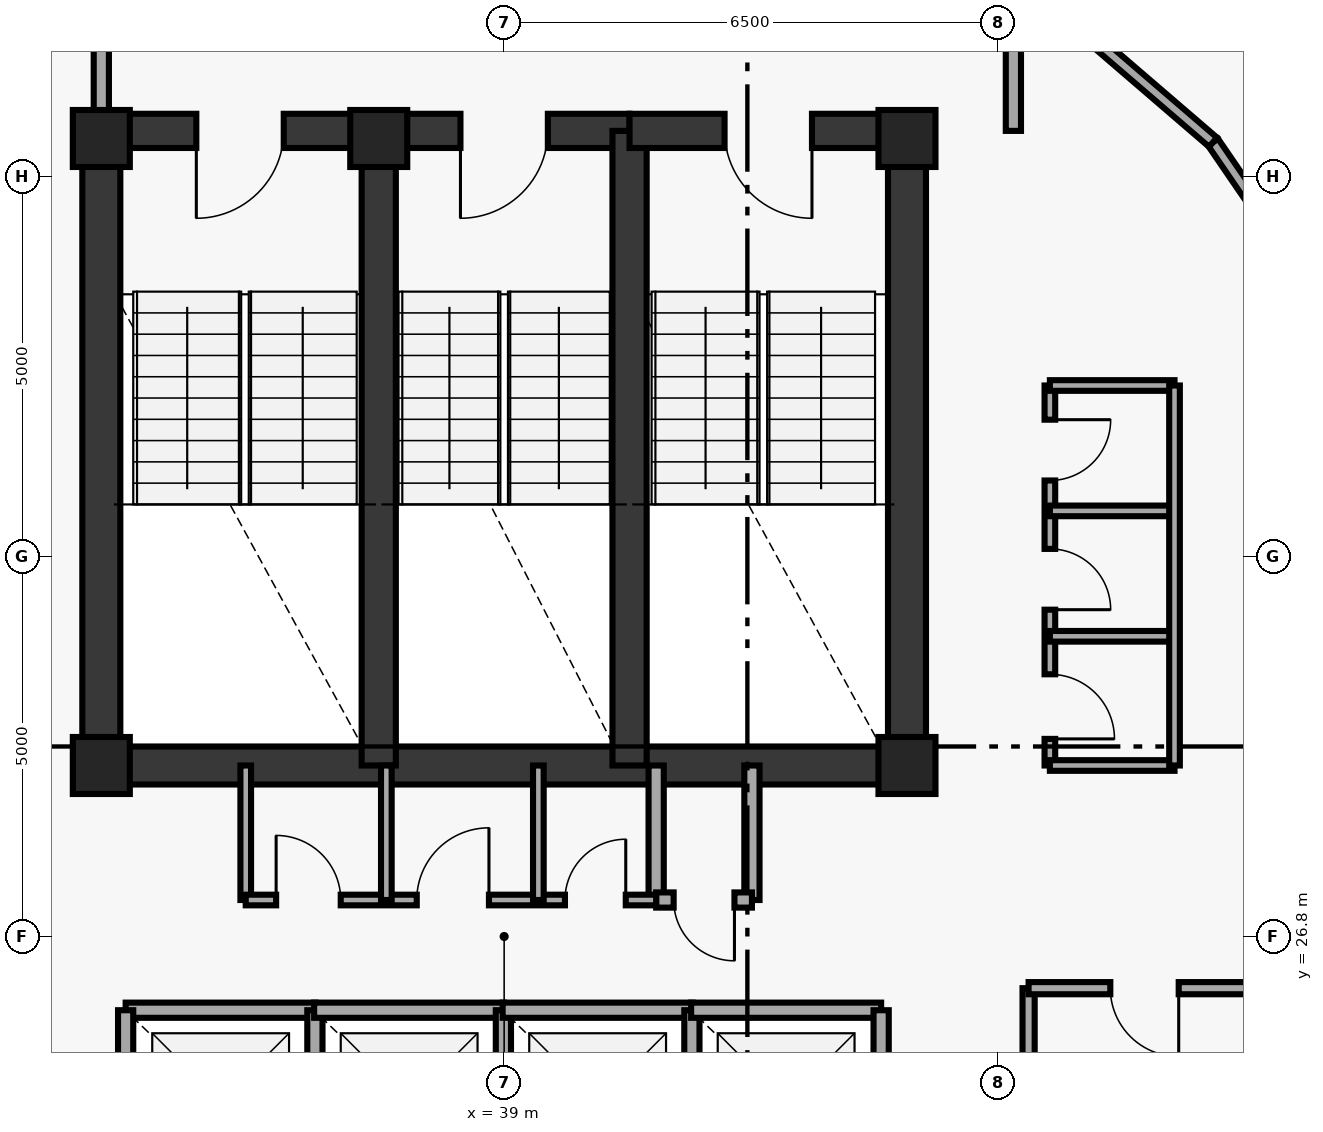
"""IFC4 building model, lengths in metres.
Left out: names, types, materials, properties, quantities, classifications, styles, units other than length and angle.
Written with IfcOpenShell. Run it as: python <this file> out.ifc"""

import sys

from ifc_helpers import new_model, si_unit, direction, frame, frame_2d, origin, origin_2d, place, context, subcontext, project, spatial, rectangle, extrude, element, fill, save


model = new_model("IFC4")
c1 = context("Model", 3, precision=1e-05, world=origin(), true_north=direction((0.0, 1.0)))
c2 = subcontext(c1, "Body", "Model", "MODEL_VIEW")
j1 = project(units=[si_unit("LENGTHUNIT", "METRE"), si_unit("PLANEANGLEUNIT", "RADIAN")], contexts=[c1])
p1 = place(None, origin())
s1 = spatial("IfcSite", under=j1, at=p1, CompositionType="ELEMENT")
p2 = place(p1, origin())
s2 = spatial("IfcBuilding", under=s1, at=p2, CompositionType="ELEMENT")
p3 = place(p2, frame((0.0, 0.0, 297.4)))
s3 = spatial("IfcBuildingStorey", under=s2, at=p3, CompositionType="ELEMENT", Elevation=297.4)
for number, where, z_axis, x_axis in (
    (1, (44.3, 29.05, 0.0), (0.0, 0.0, 1.0), (1.0, 0.0, 0.0)),
    (2, (44.3, 37.3, 0.0), (0.0, 0.0, 1.0), (1.0, 0.0, 0.0)),
    (3, (37.35, 37.3, 0.0), (0.0, 0.0, 1.0), (1.0, 0.0, 0.0)),
    (4, (33.7, 37.3, 0.0), (0.0, 0.0, 1.0), (1.0, 0.0, 0.0)),
    (5, (33.7, 29.05, 0.0), (0.0, 0.0, 1.0), (1.0, 0.0, 0.0)),
):
    element("IfcColumn", number, at=place(p3, frame(where, z_axis=z_axis, x_axis=x_axis)), inside=s3, PredefinedType="PILASTER", context=c2, shape_type="SweptSolid", body=[
        extrude(rectangle(XDim=0.75, YDim=0.75, at=origin_2d()), origin(), (0.0, 0.0, 1.0), 3.45),
    ])
for number, where, z_axis, x_axis in (
    (6, (33.7, 29.05, 0.0), (0.0, 0.0, 1.0), (0.0, 1.0, 0.0)),
    (7, (44.3, 29.05, 0.0), (0.0, 0.0, 1.0), (0.0, 1.0, 0.0)),
):
    element("IfcWall", number, at=place(p3, frame(where, z_axis=z_axis, x_axis=x_axis)), inside=s3, PredefinedType="SHEAR", context=c2, shape_type="SweptSolid", body=[
        extrude(rectangle(XDim=8.35, YDim=0.5, at=frame_2d((4.175, 0.0))), origin(), (0.0, 0.0, 1.0), 3.45),
    ])
p4 = place(p3, frame((33.7, 29.05, 0.0), z_axis=(0.0, 0.0, 1.0), x_axis=(1.0, 0.0, 0.0)))
e8 = element("IfcWall", 8, at=p4, inside=s3, PredefinedType="SHEAR", context=c2, shape_type="SweptSolid", body=[
    extrude(rectangle(XDim=10.6, YDim=0.5, at=frame_2d((5.3, 0.0))), origin(), (0.0, 0.0, 1.0), 3.45),
])
p5 = place(p3, frame((37.35, 37.4, 0.0), z_axis=(0.0, 0.0, 1.0), x_axis=(-1.0, 0.0, 0.0)))
e9 = element("IfcWall", 9, at=p5, inside=s3, PredefinedType="SHEAR", context=c2, shape_type="SweptSolid", body=[
    extrude(rectangle(XDim=3.65, YDim=0.45, at=frame_2d((1.825, 0.0))), origin(), (0.0, 0.0, 1.0), 3.45),
])
p6 = place(p5, frame((1.25, 0.0, 0.0)))
e10 = element("IfcOpeningElement", 10, at=p6, cuts=e9, PredefinedType="OPENING", context=c2, shape_type="SweptSolid", body=[
    extrude(rectangle(XDim=1.15, YDim=2.15, at=frame_2d((0.575, 1.075))), frame((0.0, 0.235, 0.0), z_axis=(0.0, -1.0, 0.0), x_axis=(1.0, 0.0, 0.0)), (0.0, 0.0, 1.0), 0.47),
])
p7 = place(p3, frame((37.35, 29.05, 0.0), z_axis=(0.0, 0.0, 1.0), x_axis=(0.0, 1.0, 0.0)))
e11 = element("IfcWall", 11, at=p7, inside=s3, PredefinedType="SHEAR", context=c2, shape_type="SweptSolid", body=[
    extrude(rectangle(XDim=8.35, YDim=0.45, at=frame_2d((4.175, 0.0))), origin(), (0.0, 0.0, 1.0), 3.45),
])
p8 = place(p3, frame((40.65, 37.4, 0.0), z_axis=(0.0, 0.0, 1.0), x_axis=(-1.0, 0.0, 0.0)))
e12 = element("IfcWall", 12, at=p8, inside=s3, PredefinedType="SHEAR", context=c2, shape_type="SweptSolid", body=[
    extrude(rectangle(XDim=3.3, YDim=0.45, at=frame_2d((1.65, 0.0))), origin(), (0.0, 0.0, 1.0), 3.45),
])
p9 = place(p8, frame((1.075, 0.0, 0.0)))
e13 = element("IfcOpeningElement", 13, at=p9, cuts=e12, PredefinedType="OPENING", context=c2, shape_type="SweptSolid", body=[
    extrude(rectangle(XDim=1.15, YDim=2.15, at=frame_2d((0.575, 1.075))), frame((0.0, 0.235, 0.0), z_axis=(0.0, -1.0, 0.0), x_axis=(1.0, 0.0, 0.0)), (0.0, 0.0, 1.0), 0.47),
])
p10 = place(p3, frame((40.65, 29.05, 0.0), z_axis=(0.0, 0.0, 1.0), x_axis=(0.0, 1.0, 0.0)))
e14 = element("IfcWall", 14, at=p10, inside=s3, PredefinedType="SHEAR", context=c2, shape_type="SweptSolid", body=[
    extrude(rectangle(XDim=8.35, YDim=0.45, at=frame_2d((4.175, 0.0))), origin(), (0.0, 0.0, 1.0), 3.45),
])
p11 = place(p3, frame((44.3, 37.4, 0.0), z_axis=(0.0, 0.0, 1.0), x_axis=(-1.0, 0.0, 0.0)))
e15 = element("IfcWall", 15, at=p11, inside=s3, PredefinedType="SHEAR", context=c2, shape_type="SweptSolid", body=[
    extrude(rectangle(XDim=3.65, YDim=0.45, at=frame_2d((1.825, 0.0))), origin(), (0.0, 0.0, 1.0), 3.45),
])
p12 = place(p11, frame((1.25, 0.0, 0.0)))
e16 = element("IfcOpeningElement", 16, at=p12, cuts=e15, PredefinedType="OPENING", context=c2, shape_type="SweptSolid", body=[
    extrude(rectangle(XDim=1.15, YDim=2.15, at=frame_2d((0.575, 1.075))), frame((0.0, 0.235, 0.0), z_axis=(0.0, -1.0, 0.0), x_axis=(1.0, 0.0, 0.0)), (0.0, 0.0, 1.0), 0.47),
])
for number, where, z_axis, x_axis in (
    (17, (33.7, 37.4, 0.0), (0.0, 0.0, 1.0), (0.0, 1.0, 0.0)),
    (18, (45.7, 37.4, 0.0), (0.0, 0.0, 1.0), (0.0, 1.0, 0.0)),
):
    element("IfcWall", number, at=place(p3, frame(where, z_axis=z_axis, x_axis=x_axis)), inside=s3, PredefinedType="SOLIDWALL", context=c2, shape_type="SweptSolid", body=[
        extrude(rectangle(XDim=1.88, YDim=0.2, at=frame_2d((0.94, 0.0))), origin(), (0.0, 0.0, 1.0), 3.45),
    ])
p13 = place(p3, frame((35.6, 27.28, 0.0), z_axis=(0.0, 0.0, 1.0), x_axis=(0.0, 1.0, 0.0)))
e19 = element("IfcWall", 19, at=p13, inside=s3, PredefinedType="PARTITIONING", context=c2, shape_type="SweptSolid", body=[
    extrude(rectangle(XDim=1.77, YDim=0.14, at=frame_2d((0.885, 0.0))), origin(), (0.0, 0.0, 1.0), 3.45),
])
for number, where, z_axis, x_axis in (
    (20, (41.0, 27.28, 0.0), (0.0, 0.0, 1.0), (0.0, 1.0, 0.0)),
    (21, (42.26, 27.28, 0.0), (0.0, 0.0, 1.0), (0.0, 1.0, 0.0)),
):
    element("IfcWall", number, at=place(p3, frame(where, z_axis=z_axis, x_axis=x_axis)), inside=s3, PredefinedType="SOLIDWALL", context=c2, shape_type="SweptSolid", body=[
        extrude(rectangle(XDim=1.77, YDim=0.2, at=frame_2d((0.885, 0.0))), origin(), (0.0, 0.0, 1.0), 3.45),
    ])
p14 = place(p3, frame((41.0, 27.28, 0.0), z_axis=(0.0, 0.0, 1.0), x_axis=(1.0, 0.0, 0.0)))
e22 = element("IfcWall", 22, at=p14, inside=s3, PredefinedType="SOLIDWALL", context=c2, shape_type="SweptSolid", body=[
    extrude(rectangle(XDim=1.26, YDim=0.2, at=frame_2d((0.63, 0.0))), origin(), (0.0, 0.0, 1.0), 3.45),
])
p15 = place(p14, frame((0.23, 0.0, 0.0)))
e23 = element("IfcOpeningElement", 23, at=p15, cuts=e22, PredefinedType="OPENING", context=c2, shape_type="SweptSolid", body=[
    extrude(rectangle(XDim=0.8, YDim=2.05, at=frame_2d((0.4, 1.025))), frame((0.0, 0.11, 0.0), z_axis=(0.0, -1.0, 0.0), x_axis=(1.0, 0.0, 0.0)), (0.0, 0.0, 1.0), 0.22),
])
p16 = place(p3, frame((34.02, 25.83, 0.0), z_axis=(0.0, 0.0, 1.0), x_axis=(1.0, 0.0, 0.0)))
e24 = element("IfcWall", 24, at=p16, inside=s3, PredefinedType="SOLIDWALL", context=c2, shape_type="SweptSolid", body=[
    extrude(rectangle(XDim=2.5, YDim=0.2, at=frame_2d((1.25, 0.0))), origin(), (0.0, 0.0, 1.0), 3.45),
])
for number, where, z_axis, x_axis in (
    (25, (34.02, 23.42, 0.0), (0.0, 0.0, 1.0), (0.0, 1.0, 0.0)),
    (26, (36.51, 23.42, 0.0), (0.0, 0.0, 1.0), (0.0, 1.0, 0.0)),
):
    element("IfcWall", number, at=place(p3, frame(where, z_axis=z_axis, x_axis=x_axis)), inside=s3, PredefinedType="SOLIDWALL", context=c2, shape_type="SweptSolid", body=[
        extrude(rectangle(XDim=2.41, YDim=0.2, at=frame_2d((1.205, 0.0))), origin(), (0.0, 0.0, 1.0), 3.45),
    ])
p17 = place(p3, frame((36.5, 25.83, 0.0), z_axis=(0.0, 0.0, 1.0), x_axis=(1.0, 0.0, 0.0)))
e27 = element("IfcWall", 27, at=p17, inside=s3, PredefinedType="SOLIDWALL", context=c2, shape_type="SweptSolid", body=[
    extrude(rectangle(XDim=2.5, YDim=0.2, at=frame_2d((1.25, 0.0))), origin(), (0.0, 0.0, 1.0), 3.45),
])
p18 = place(p3, frame((38.99, 23.42, 0.0), z_axis=(0.0, 0.0, 1.0), x_axis=(0.0, 1.0, 0.0)))
e28 = element("IfcWall", 28, at=p18, inside=s3, PredefinedType="SOLIDWALL", context=c2, shape_type="SweptSolid", body=[
    extrude(rectangle(XDim=2.41, YDim=0.2, at=frame_2d((1.205, 0.0))), origin(), (0.0, 0.0, 1.0), 3.45),
])
p19 = place(p3, frame((38.98, 25.83, 0.0), z_axis=(0.0, 0.0, 1.0), x_axis=(1.0, 0.0, 0.0)))
e29 = element("IfcWall", 29, at=p19, inside=s3, PredefinedType="SOLIDWALL", context=c2, shape_type="SweptSolid", body=[
    extrude(rectangle(XDim=2.5, YDim=0.2, at=frame_2d((1.25, 0.0))), origin(), (0.0, 0.0, 1.0), 3.45),
])
p20 = place(p3, frame((41.47, 23.42, 0.0), z_axis=(0.0, 0.0, 1.0), x_axis=(0.0, 1.0, 0.0)))
e30 = element("IfcWall", 30, at=p20, inside=s3, PredefinedType="SOLIDWALL", context=c2, shape_type="SweptSolid", body=[
    extrude(rectangle(XDim=2.41, YDim=0.2, at=frame_2d((1.205, 0.0))), origin(), (0.0, 0.0, 1.0), 3.45),
])
p21 = place(p3, frame((41.46, 25.83, 0.0), z_axis=(0.0, 0.0, 1.0), x_axis=(1.0, 0.0, 0.0)))
e31 = element("IfcWall", 31, at=p21, inside=s3, PredefinedType="SOLIDWALL", context=c2, shape_type="SweptSolid", body=[
    extrude(rectangle(XDim=2.5, YDim=0.2, at=frame_2d((1.25, 0.0))), origin(), (0.0, 0.0, 1.0), 3.45),
])
p22 = place(p3, frame((43.96, 23.42, 0.0), z_axis=(0.0, 0.0, 1.0), x_axis=(0.0, 1.0, 0.0)))
e32 = element("IfcWall", 32, at=p22, inside=s3, PredefinedType="SOLIDWALL", context=c2, shape_type="SweptSolid", body=[
    extrude(rectangle(XDim=2.41, YDim=0.2, at=frame_2d((1.205, 0.0))), origin(), (0.0, 0.0, 1.0), 3.45),
])
p23 = place(p3, frame((45.9, 19.05, 0.0), z_axis=(0.0, 0.0, 1.0), x_axis=(0.0, 1.0, 0.0)))
e33 = element("IfcWall", 33, at=p23, inside=s3, PredefinedType="PARTITIONING", context=c2, shape_type="SweptSolid", body=[
    extrude(rectangle(XDim=7.07, YDim=0.16, at=frame_2d((3.535, 0.0))), origin(), (0.0, 0.0, 1.0), 3.45),
])
p24 = place(p3, frame((48.95, 26.12, 0.0), z_axis=(0.0, 0.0, 1.0), x_axis=(-1.0, 0.0, 0.0)))
e34 = element("IfcWall", 34, at=p24, inside=s3, PredefinedType="PARTITIONING", context=c2, shape_type="SweptSolid", body=[
    extrude(rectangle(XDim=3.05, YDim=0.16, at=frame_2d((1.525, 0.0))), origin(), (0.0, 0.0, 1.0), 3.45),
])
p25 = place(p24, frame((1.075, 0.0, 0.0)))
e35 = element("IfcOpeningElement", 35, at=p25, cuts=e34, PredefinedType="OPENING", context=c2, shape_type="SweptSolid", body=[
    extrude(rectangle(XDim=0.9, YDim=2.1, at=frame_2d((0.45, 1.05))), frame((0.0, 0.09, 0.0), z_axis=(0.0, -1.0, 0.0), x_axis=(1.0, 0.0, 0.0)), (0.0, 0.0, 1.0), 0.18),
])
p26 = place(p3, frame((35.6, 27.28, 0.0), z_axis=(0.0, 0.0, 1.0), x_axis=(1.0, 0.0, 0.0)))
e36 = element("IfcWall", 36, at=p26, inside=s3, PredefinedType="PARTITIONING", context=c2, shape_type="SweptSolid", body=[
    extrude(rectangle(XDim=5.4, YDim=0.14, at=frame_2d((2.7, 0.0))), origin(), (0.0, 0.0, 1.0), 3.45),
])
p27 = place(p26, frame((0.4, 0.0, 0.0)))
e37 = element("IfcOpeningElement", 37, at=p27, cuts=e36, PredefinedType="OPENING", context=c2, shape_type="SweptSolid", body=[
    extrude(rectangle(XDim=0.85, YDim=2.1, at=frame_2d((0.425, 1.05))), frame((0.0, 0.08, 0.0), z_axis=(0.0, -1.0, 0.0), x_axis=(1.0, 0.0, 0.0)), (0.0, 0.0, 1.0), 0.16),
])
p28 = place(p26, frame((2.25, 0.0, 0.0)))
e38 = element("IfcOpeningElement", 38, at=p28, cuts=e36, PredefinedType="OPENING", context=c2, shape_type="SweptSolid", body=[
    extrude(rectangle(XDim=0.95, YDim=2.1, at=frame_2d((0.475, 1.05))), frame((0.0, 0.08, 0.0), z_axis=(0.0, -1.0, 0.0), x_axis=(1.0, 0.0, 0.0)), (0.0, 0.0, 1.0), 0.16),
])
p29 = place(p26, frame((4.2, 0.0, 0.0)))
e39 = element("IfcOpeningElement", 39, at=p29, cuts=e36, PredefinedType="OPENING", context=c2, shape_type="SweptSolid", body=[
    extrude(rectangle(XDim=0.8, YDim=2.05, at=frame_2d((0.4, 1.025))), frame((0.0, 0.08, 0.0), z_axis=(0.0, -1.0, 0.0), x_axis=(1.0, 0.0, 0.0)), (0.0, 0.0, 1.0), 0.16),
])
for number, where, z_axis, x_axis in (
    (40, (37.45, 27.28, 0.0), (0.0, 0.0, 1.0), (0.0, 1.0, 0.0)),
    (41, (39.45, 27.28, 0.0), (0.0, 0.0, 1.0), (0.0, 1.0, 0.0)),
):
    element("IfcWall", number, at=place(p3, frame(where, z_axis=z_axis, x_axis=x_axis)), inside=s3, PredefinedType="PARTITIONING", context=c2, shape_type="SweptSolid", body=[
        extrude(rectangle(XDim=1.77, YDim=0.14, at=frame_2d((0.885, 0.0))), origin(), (0.0, 0.0, 1.0), 3.45),
    ])
p30 = place(p3, frame((46.18, 34.05, 0.0), z_axis=(0.0, 0.0, 1.0), x_axis=(0.0, -1.0, 0.0)))
e42 = element("IfcWall", 42, at=p30, inside=s3, PredefinedType="PARTITIONING", context=c2, shape_type="SweptSolid", body=[
    extrude(rectangle(XDim=5.0, YDim=0.14, at=frame_2d((2.5, 0.0))), origin(), (0.0, 0.0, 1.0), 3.45),
])
p31 = place(p30, frame((3.8, 0.0, 0.0)))
e43 = element("IfcOpeningElement", 43, at=p31, cuts=e42, PredefinedType="OPENING", context=c2, shape_type="SweptSolid", body=[
    extrude(rectangle(XDim=0.85, YDim=2.1, at=frame_2d((0.425, 1.05))), frame((0.0, 0.08, 0.0), z_axis=(0.0, -1.0, 0.0), x_axis=(1.0, 0.0, 0.0)), (0.0, 0.0, 1.0), 0.16),
])
p32 = place(p30, frame((2.15, 0.0, 0.0)))
e44 = element("IfcOpeningElement", 44, at=p32, cuts=e42, PredefinedType="OPENING", context=c2, shape_type="SweptSolid", body=[
    extrude(rectangle(XDim=0.8, YDim=2.05, at=frame_2d((0.4, 1.025))), frame((0.0, 0.08, 0.0), z_axis=(0.0, -1.0, 0.0), x_axis=(1.0, 0.0, 0.0)), (0.0, 0.0, 1.0), 0.16),
])
p33 = place(p30, frame((0.45, 0.0, 0.0)))
e45 = element("IfcOpeningElement", 45, at=p33, cuts=e42, PredefinedType="OPENING", context=c2, shape_type="SweptSolid", body=[
    extrude(rectangle(XDim=0.8, YDim=2.05, at=frame_2d((0.4, 1.025))), frame((0.0, 0.08, 0.0), z_axis=(0.0, -1.0, 0.0), x_axis=(1.0, 0.0, 0.0)), (0.0, 0.0, 1.0), 0.16),
])
for number, where, z_axis, x_axis in (
    (46, (46.18, 29.05, 0.0), (0.0, 0.0, 1.0), (1.0, 0.0, 0.0)),
    (47, (46.18, 30.75, 0.0), (0.0, 0.0, 1.0), (1.0, 0.0, 0.0)),
    (48, (46.18, 32.4, 0.0), (0.0, 0.0, 1.0), (1.0, 0.0, 0.0)),
    (49, (46.18, 34.05, 0.0), (0.0, 0.0, 1.0), (1.0, 0.0, 0.0)),
):
    element("IfcWall", number, at=place(p3, frame(where, z_axis=z_axis, x_axis=x_axis)), inside=s3, PredefinedType="PARTITIONING", context=c2, shape_type="SweptSolid", body=[
        extrude(rectangle(XDim=1.64, YDim=0.14, at=frame_2d((0.82, 0.0))), origin(), (0.0, 0.0, 1.0), 3.45),
    ])
p34 = place(p3, frame((47.82, 29.05, 0.0), z_axis=(0.0, 0.0, 1.0), x_axis=(0.0, 1.0, 0.0)))
e50 = element("IfcWall", 50, at=p34, inside=s3, PredefinedType="PARTITIONING", context=c2, shape_type="SweptSolid", body=[
    extrude(rectangle(XDim=5.0, YDim=0.14, at=frame_2d((2.5, 0.0))), origin(), (0.0, 0.0, 1.0), 3.45),
])
p35 = place(p3, frame((50.423, 34.19, 0.0), z_axis=(0.0, 0.0, 1.0), x_axis=(-0.565014144236, 0.825081218313, 0.0)))
e51 = element("IfcWall", 51, at=p35, inside=s3, PredefinedType="PARTITIONING", context=c2, shape_type="SweptSolid", body=[
    extrude(rectangle(XDim=3.71, YDim=0.16, at=frame_2d((1.855, 0.0))), origin(), (0.0, 0.0, 1.0), 3.45),
])
p36 = place(p3, frame((48.327, 37.251, 0.0), z_axis=(0.0, 0.0, 1.0), x_axis=(-0.758232091793, 0.651984735231, 0.0)))
e52 = element("IfcWall", 52, at=p36, inside=s3, PredefinedType="PARTITIONING", context=c2, shape_type="SweptSolid", body=[
    extrude(rectangle(XDim=3.603, YDim=0.16, at=frame_2d((1.802, 0.0))), origin(), (0.0, 0.0, 1.0), 3.45),
])
p37 = place(p3, frame((46.71, 40.795, 0.0), z_axis=(0.0, 0.0, 1.0), x_axis=(0.779367114883, -0.62656755441, 0.0)))
e53 = element("IfcWall", 53, at=p37, inside=s3, PredefinedType="PARTITIONING", context=c2, shape_type="SweptSolid", body=[
    extrude(rectangle(XDim=4.098, YDim=0.125, at=frame_2d((2.049, 0.0))), origin(), (0.0, 0.0, 1.0), 3.45),
])
p38 = place(p37, frame((2.998, 0.0, 0.0)))
e54 = element("IfcOpeningElement", 54, at=p38, cuts=e53, PredefinedType="OPENING", context=c2, shape_type="SweptSolid", body=[
    extrude(rectangle(XDim=0.9, YDim=2.1, at=frame_2d((0.45, 1.05))), frame((0.0, 0.073, 0.0), z_axis=(0.0, -1.0, 0.0), x_axis=(1.0, 0.0, 0.0)), (0.0, 0.0, 1.0), 0.145),
])
p39 = place(p3, frame((33.3, 39.167, 0.0), z_axis=(0.0, 0.0, 1.0), x_axis=(-0.623915746766, -0.781491612839, 0.0)))
e55 = element("IfcWall", 55, at=p39, inside=s3, PredefinedType="PARTITIONING", context=c2, shape_type="SweptSolid", body=[
    extrude(rectangle(XDim=6.688, YDim=0.16, at=frame_2d((3.344, 0.0))), origin(), (0.0, 0.0, 1.0), 3.45),
])
p40 = place(p6, origin())
e56 = element("IfcDoor", 56, at=p40, inside=s3, OperationType="SINGLE_SWING_RIGHT", PredefinedType="DOOR", context=c2, shape_type="SweptSolid", body=[
    extrude(rectangle(XDim=1.15, YDim=2.15, at=frame_2d((0.575, 1.075))), frame((0.0, 0.025, 0.0), z_axis=(0.0, -1.0, 0.0), x_axis=(1.0, 0.0, 0.0)), (0.0, 0.0, 1.0), 0.05),
])
fill(e10, e56)
p41 = place(p9, origin())
e57 = element("IfcDoor", 57, at=p41, inside=s3, OperationType="SINGLE_SWING_RIGHT", PredefinedType="DOOR", context=c2, shape_type="SweptSolid", body=[
    extrude(rectangle(XDim=1.15, YDim=2.15, at=frame_2d((0.575, 1.075))), frame((0.0, 0.025, 0.0), z_axis=(0.0, -1.0, 0.0), x_axis=(1.0, 0.0, 0.0)), (0.0, 0.0, 1.0), 0.05),
])
fill(e13, e57)
p42 = place(p12, origin())
e58 = element("IfcDoor", 58, at=p42, inside=s3, OperationType="SINGLE_SWING_LEFT", PredefinedType="DOOR", context=c2, shape_type="SweptSolid", body=[
    extrude(rectangle(XDim=1.15, YDim=2.15, at=frame_2d((0.575, 1.075))), frame((0.0, 0.025, 0.0), z_axis=(0.0, -1.0, 0.0), x_axis=(1.0, 0.0, 0.0)), (0.0, 0.0, 1.0), 0.05),
])
fill(e16, e58)
p43 = place(p15, origin())
e59 = element("IfcDoor", 59, at=p43, inside=s3, OperationType="SINGLE_SWING_RIGHT", PredefinedType="DOOR", context=c2, shape_type="SweptSolid", body=[
    extrude(rectangle(XDim=0.8, YDim=2.05, at=frame_2d((0.4, 1.025))), frame((0.0, 0.025, 0.0), z_axis=(0.0, -1.0, 0.0), x_axis=(1.0, 0.0, 0.0)), (0.0, 0.0, 1.0), 0.05),
])
fill(e23, e59)
p44 = place(p25, origin())
e60 = element("IfcDoor", 60, at=p44, inside=s3, OperationType="SINGLE_SWING_LEFT", PredefinedType="DOOR", context=c2, shape_type="SweptSolid", body=[
    extrude(rectangle(XDim=0.9, YDim=2.1, at=frame_2d((0.45, 1.05))), frame((0.0, 0.025, 0.0), z_axis=(0.0, -1.0, 0.0), x_axis=(1.0, 0.0, 0.0)), (0.0, 0.0, 1.0), 0.05),
])
fill(e35, e60)
p45 = place(p27, origin())
e61 = element("IfcDoor", 61, at=p45, inside=s3, OperationType="SINGLE_SWING_LEFT", PredefinedType="DOOR", context=c2, shape_type="SweptSolid", body=[
    extrude(rectangle(XDim=0.85, YDim=2.1, at=frame_2d((0.425, 1.05))), frame((0.0, 0.025, 0.0), z_axis=(0.0, -1.0, 0.0), x_axis=(1.0, 0.0, 0.0)), (0.0, 0.0, 1.0), 0.05),
])
fill(e37, e61)
p46 = place(p28, origin())
e62 = element("IfcDoor", 62, at=p46, inside=s3, OperationType="SINGLE_SWING_RIGHT", PredefinedType="DOOR", context=c2, shape_type="SweptSolid", body=[
    extrude(rectangle(XDim=0.95, YDim=2.1, at=frame_2d((0.475, 1.05))), frame((0.0, 0.025, 0.0), z_axis=(0.0, -1.0, 0.0), x_axis=(1.0, 0.0, 0.0)), (0.0, 0.0, 1.0), 0.05),
])
fill(e38, e62)
p47 = place(p29, origin())
e63 = element("IfcDoor", 63, at=p47, inside=s3, OperationType="SINGLE_SWING_RIGHT", PredefinedType="DOOR", context=c2, shape_type="SweptSolid", body=[
    extrude(rectangle(XDim=0.8, YDim=2.05, at=frame_2d((0.4, 1.025))), frame((0.0, 0.025, 0.0), z_axis=(0.0, -1.0, 0.0), x_axis=(1.0, 0.0, 0.0)), (0.0, 0.0, 1.0), 0.05),
])
fill(e39, e63)
p48 = place(p31, origin())
e64 = element("IfcDoor", 64, at=p48, inside=s3, OperationType="SINGLE_SWING_RIGHT", PredefinedType="DOOR", context=c2, shape_type="SweptSolid", body=[
    extrude(rectangle(XDim=0.85, YDim=2.1, at=frame_2d((0.425, 1.05))), frame((0.0, 0.025, 0.0), z_axis=(0.0, -1.0, 0.0), x_axis=(1.0, 0.0, 0.0)), (0.0, 0.0, 1.0), 0.05),
])
fill(e43, e64)
p49 = place(p32, origin())
e65 = element("IfcDoor", 65, at=p49, inside=s3, OperationType="SINGLE_SWING_RIGHT", PredefinedType="DOOR", context=c2, shape_type="SweptSolid", body=[
    extrude(rectangle(XDim=0.8, YDim=2.05, at=frame_2d((0.4, 1.025))), frame((0.0, 0.025, 0.0), z_axis=(0.0, -1.0, 0.0), x_axis=(1.0, 0.0, 0.0)), (0.0, 0.0, 1.0), 0.05),
])
fill(e44, e65)
p50 = place(p33, origin())
e66 = element("IfcDoor", 66, at=p50, inside=s3, OperationType="SINGLE_SWING_LEFT", PredefinedType="DOOR", context=c2, shape_type="SweptSolid", body=[
    extrude(rectangle(XDim=0.8, YDim=2.05, at=frame_2d((0.4, 1.025))), frame((0.0, 0.025, 0.0), z_axis=(0.0, -1.0, 0.0), x_axis=(1.0, 0.0, 0.0)), (0.0, 0.0, 1.0), 0.05),
])
fill(e45, e66)
save(model, sys.argv[1])
